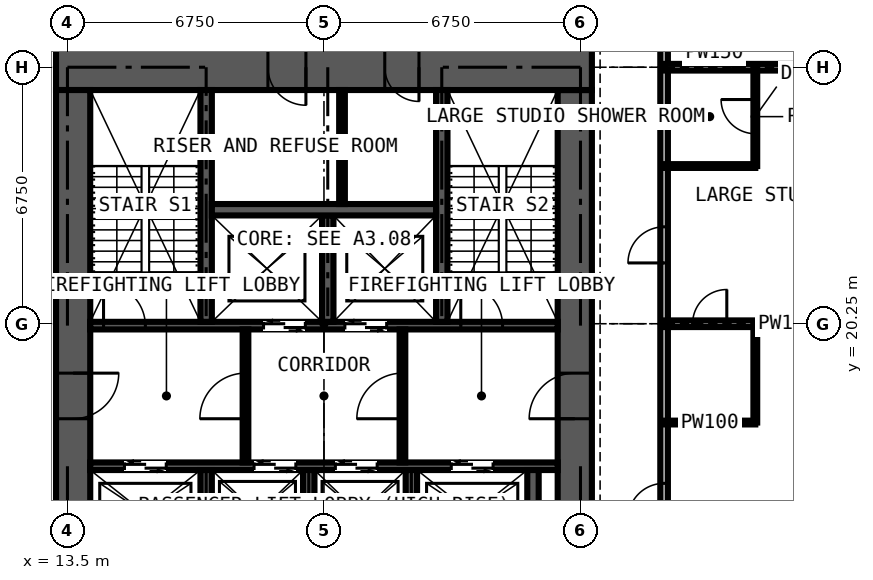
"""IFC4 building model, lengths in metres.
Left out: names, types, materials, properties, quantities, classifications, styles, units other than length and angle.
Written with IfcOpenShell. Run it as: python <this file> out.ifc"""

import sys

from ifc_helpers import new_model, si_unit, direction, frame, frame_2d, origin, place, context, subcontext, project, spatial, rectangle, extrude, element, fill, save


model = new_model("IFC4")
c1 = context("Model", 3, precision=1e-05, world=origin(), true_north=direction((0.0, 1.0)))
c2 = subcontext(c1, "Body", "Model", "MODEL_VIEW")
j1 = project(units=[si_unit("LENGTHUNIT", "METRE"), si_unit("PLANEANGLEUNIT", "RADIAN")], contexts=[c1])
p1 = place(None, origin())
s1 = spatial("IfcSite", under=j1, at=p1, CompositionType="ELEMENT")
p2 = place(p1, origin())
s2 = spatial("IfcBuilding", under=s1, at=p2, CompositionType="ELEMENT")
p3 = place(p2, frame((0.0, 0.0, 236.7)))
s3 = spatial("IfcBuildingStorey", under=s2, at=p3, CompositionType="ELEMENT", Elevation=236.7)
p4 = place(p3, frame((26.85, 14.1, 0.0), z_axis=(0.0, 0.0, 1.0), x_axis=(0.0, 1.0, 0.0)))
e1 = element("IfcWall", 1, at=p4, inside=s3, PredefinedType="SHEAR", context=c2, shape_type="SweptSolid", body=[
    extrude(rectangle(XDim=12.3, YDim=0.9, at=frame_2d((6.15, 0.0))), origin(), (0.0, 0.0, 1.0), 3.6),
])
p5 = place(p4, frame((3.65, 0.0, 0.0)))
e2 = element("IfcOpeningElement", 2, at=p5, cuts=e1, PredefinedType="OPENING", context=c2, shape_type="SweptSolid", body=[
    extrude(rectangle(XDim=1.2, YDim=2.2, at=frame_2d((0.6, 1.1))), frame((0.0, 0.46, 0.0), z_axis=(0.0, -1.0, 0.0), x_axis=(1.0, 0.0, 0.0)), (0.0, 0.0, 1.0), 0.92),
])
p6 = place(p3, frame((27.3, 27.0, 0.0), z_axis=(0.0, 0.0, 1.0), x_axis=(-1.0, 0.0, 0.0)))
e3 = element("IfcWall", 3, at=p6, inside=s3, PredefinedType="SHEAR", context=c2, shape_type="SweptSolid", body=[
    extrude(rectangle(XDim=14.1, YDim=1.2, at=frame_2d((7.05, 0.0))), origin(), (0.0, 0.0, 1.0), 3.6),
])
p7 = place(p6, frame((4.55, 0.0, 0.0)))
e4 = element("IfcOpeningElement", 4, at=p7, cuts=e3, PredefinedType="OPENING", context=c2, shape_type="SweptSolid", body=[
    extrude(rectangle(XDim=0.9, YDim=2.2, at=frame_2d((0.45, 1.1))), frame((0.0, 0.61, 0.0), z_axis=(0.0, -1.0, 0.0), x_axis=(1.0, 0.0, 0.0)), (0.0, 0.0, 1.0), 1.22),
])
p8 = place(p6, frame((7.525, 0.0, 0.0)))
e5 = element("IfcOpeningElement", 5, at=p8, cuts=e3, PredefinedType="OPENING", context=c2, shape_type="SweptSolid", body=[
    extrude(rectangle(XDim=1.0, YDim=2.2, at=frame_2d((0.5, 1.1))), frame((0.0, 0.61, 0.0), z_axis=(0.0, -1.0, 0.0), x_axis=(1.0, 0.0, 0.0)), (0.0, 0.0, 1.0), 1.22),
])
p9 = place(p3, frame((13.65, 26.4, 0.0), z_axis=(0.0, 0.0, 1.0), x_axis=(0.0, -1.0, 0.0)))
e6 = element("IfcWall", 6, at=p9, inside=s3, PredefinedType="SHEAR", context=c2, shape_type="SweptSolid", body=[
    extrude(rectangle(XDim=12.3, YDim=0.9, at=frame_2d((6.15, 0.0))), origin(), (0.0, 0.0, 1.0), 3.6),
])
p10 = place(p9, frame((7.45, 0.0, 0.0)))
e7 = element("IfcOpeningElement", 7, at=p10, cuts=e6, PredefinedType="OPENING", context=c2, shape_type="SweptSolid", body=[
    extrude(rectangle(XDim=1.2, YDim=2.2, at=frame_2d((0.6, 1.1))), frame((0.0, 0.46, 0.0), z_axis=(0.0, -1.0, 0.0), x_axis=(1.0, 0.0, 0.0)), (0.0, 0.0, 1.0), 0.92),
])
p11 = place(p3, frame((14.1, 16.5, 0.0), z_axis=(0.0, 0.0, 1.0), x_axis=(1.0, 0.0, 0.0)))
e8 = element("IfcWall", 8, at=p11, inside=s3, PredefinedType="SHEAR", context=c2, shape_type="SweptSolid", body=[
    extrude(rectangle(XDim=12.3, YDim=0.2, at=frame_2d((6.15, 0.0))), origin(), (0.0, 0.0, 1.0), 3.6),
])
p12 = place(p11, frame((0.9, 0.0, 0.0)))
e9 = element("IfcOpeningElement", 9, at=p12, cuts=e8, PredefinedType="OPENING", context=c2, shape_type="SweptSolid", body=[
    extrude(rectangle(XDim=1.1, YDim=2.2, at=frame_2d((0.55, 1.1))), frame((0.0, 0.11, 0.0), z_axis=(0.0, -1.0, 0.0), x_axis=(1.0, 0.0, 0.0)), (0.0, 0.0, 1.0), 0.22),
])
p13 = place(p11, frame((4.31, 0.0, 0.0)))
e10 = element("IfcOpeningElement", 10, at=p13, cuts=e8, PredefinedType="OPENING", context=c2, shape_type="SweptSolid", body=[
    extrude(rectangle(XDim=1.1, YDim=2.2, at=frame_2d((0.55, 1.1))), frame((0.0, 0.11, 0.0), z_axis=(0.0, -1.0, 0.0), x_axis=(1.0, 0.0, 0.0)), (0.0, 0.0, 1.0), 0.22),
])
p14 = place(p11, frame((6.45, 0.0, 0.0)))
e11 = element("IfcOpeningElement", 11, at=p14, cuts=e8, PredefinedType="OPENING", context=c2, shape_type="SweptSolid", body=[
    extrude(rectangle(XDim=1.1, YDim=2.2, at=frame_2d((0.55, 1.1))), frame((0.0, 0.11, 0.0), z_axis=(0.0, -1.0, 0.0), x_axis=(1.0, 0.0, 0.0)), (0.0, 0.0, 1.0), 0.22),
])
p15 = place(p11, frame((9.5, 0.0, 0.0)))
e12 = element("IfcOpeningElement", 12, at=p15, cuts=e8, PredefinedType="OPENING", context=c2, shape_type="SweptSolid", body=[
    extrude(rectangle(XDim=1.1, YDim=2.2, at=frame_2d((0.55, 1.1))), frame((0.0, 0.11, 0.0), z_axis=(0.0, -1.0, 0.0), x_axis=(1.0, 0.0, 0.0)), (0.0, 0.0, 1.0), 0.22),
])
p16 = place(p3, frame((14.1, 20.2, 0.0), z_axis=(0.0, 0.0, 1.0), x_axis=(1.0, 0.0, 0.0)))
e13 = element("IfcWall", 13, at=p16, inside=s3, PredefinedType="SHEAR", context=c2, shape_type="SweptSolid", body=[
    extrude(rectangle(XDim=12.3, YDim=0.2, at=frame_2d((6.15, 0.0))), origin(), (0.0, 0.0, 1.0), 3.6),
])
p17 = place(p16, frame((4.56, 0.0, 0.0)))
e14 = element("IfcOpeningElement", 14, at=p17, cuts=e13, PredefinedType="OPENING", context=c2, shape_type="SweptSolid", body=[
    extrude(rectangle(XDim=1.1, YDim=2.2, at=frame_2d((0.55, 1.1))), frame((0.0, 0.11, 0.0), z_axis=(0.0, -1.0, 0.0), x_axis=(1.0, 0.0, 0.0)), (0.0, 0.0, 1.0), 0.22),
])
p18 = place(p16, frame((6.7, 0.0, 0.0)))
e15 = element("IfcOpeningElement", 15, at=p18, cuts=e13, PredefinedType="OPENING", context=c2, shape_type="SweptSolid", body=[
    extrude(rectangle(XDim=1.1, YDim=2.2, at=frame_2d((0.55, 1.1))), frame((0.0, 0.11, 0.0), z_axis=(0.0, -1.0, 0.0), x_axis=(1.0, 0.0, 0.0)), (0.0, 0.0, 1.0), 0.22),
])
p19 = place(p16, frame((0.35, 0.0, 0.0)))
e16 = element("IfcOpeningElement", 16, at=p19, cuts=e13, PredefinedType="OPENING", context=c2, shape_type="SweptSolid", body=[
    extrude(rectangle(XDim=1.1, YDim=2.2, at=frame_2d((0.55, 1.1))), frame((0.0, 0.11, 0.0), z_axis=(0.0, -1.0, 0.0), x_axis=(1.0, 0.0, 0.0)), (0.0, 0.0, 1.0), 0.22),
])
p20 = place(p16, frame((9.75, 0.0, 0.0)))
e17 = element("IfcOpeningElement", 17, at=p20, cuts=e13, PredefinedType="OPENING", context=c2, shape_type="SweptSolid", body=[
    extrude(rectangle(XDim=1.1, YDim=2.2, at=frame_2d((0.55, 1.1))), frame((0.0, 0.11, 0.0), z_axis=(0.0, -1.0, 0.0), x_axis=(1.0, 0.0, 0.0)), (0.0, 0.0, 1.0), 0.22),
])
for number, where, z_axis, x_axis in (
    (18, (17.15, 20.3, 0.0), (0.0, 0.0, 1.0), (0.0, 1.0, 0.0)),
    (19, (23.35, 20.3, 0.0), (0.0, 0.0, 1.0), (0.0, 1.0, 0.0)),
):
    element("IfcWall", number, at=place(p3, frame(where, z_axis=z_axis, x_axis=x_axis)), inside=s3, PredefinedType="SHEAR", context=c2, shape_type="SweptSolid", body=[
        extrude(rectangle(XDim=6.1, YDim=0.3, at=frame_2d((3.05, 0.0))), origin(), (0.0, 0.0, 1.0), 3.6),
    ])
p21 = place(p3, frame((20.35, 20.3, 0.0), z_axis=(0.0, 0.0, 1.0), x_axis=(0.0, 1.0, 0.0)))
e20 = element("IfcWall", 20, at=p21, inside=s3, PredefinedType="SHEAR", context=c2, shape_type="SweptSolid", body=[
    extrude(rectangle(XDim=2.8, YDim=0.3, at=frame_2d((1.4, 0.0))), origin(), (0.0, 0.0, 1.0), 3.6),
])
p22 = place(p3, frame((17.3, 23.25, 0.0), z_axis=(0.0, 0.0, 1.0), x_axis=(1.0, 0.0, 0.0)))
e21 = element("IfcWall", 21, at=p22, inside=s3, PredefinedType="SHEAR", context=c2, shape_type="SweptSolid", body=[
    extrude(rectangle(XDim=5.9, YDim=0.3, at=frame_2d((2.95, 0.0))), origin(), (0.0, 0.0, 1.0), 3.6),
])
for number, where, z_axis, x_axis in (
    (22, (17.15, 14.1, 0.0), (0.0, 0.0, 1.0), (0.0, 1.0, 0.0)),
    (23, (19.85, 14.1, 0.0), (0.0, 0.0, 1.0), (0.0, 1.0, 0.0)),
    (24, (22.55, 14.1, 0.0), (0.0, 0.0, 1.0), (0.0, 1.0, 0.0)),
    (25, (25.75, 14.1, 0.0), (0.0, 0.0, 1.0), (0.0, 1.0, 0.0)),
):
    element("IfcWall", number, at=place(p3, frame(where, z_axis=z_axis, x_axis=x_axis)), inside=s3, PredefinedType="SHEAR", context=c2, shape_type="SweptSolid", body=[
        extrude(rectangle(XDim=2.3, YDim=0.3, at=frame_2d((1.15, 0.0))), origin(), (0.0, 0.0, 1.0), 3.6),
    ])
p23 = place(p3, frame((18.185, 16.6, 0.0), z_axis=(0.0, 0.0, 1.0), x_axis=(0.0, 1.0, 0.0)))
e26 = element("IfcWall", 26, at=p23, inside=s3, PredefinedType="PARTITIONING", context=c2, shape_type="SweptSolid", body=[
    extrude(rectangle(XDim=3.5, YDim=0.15, at=frame_2d((1.75, 0.0))), origin(), (0.0, 0.0, 1.0), 3.375),
])
p24 = place(p23, frame((1.15, 0.0, 0.0)))
e27 = element("IfcOpeningElement", 27, at=p24, cuts=e26, PredefinedType="OPENING", context=c2, shape_type="SweptSolid", body=[
    extrude(rectangle(XDim=1.2, YDim=2.2, at=frame_2d((0.6, 1.1))), frame((0.0, 0.085, 0.0), z_axis=(0.0, -1.0, 0.0), x_axis=(1.0, 0.0, 0.0)), (0.0, 0.0, 1.0), 0.17),
])
p25 = place(p3, frame((22.315, 16.6, 0.0), z_axis=(0.0, 0.0, 1.0), x_axis=(0.0, 1.0, 0.0)))
e28 = element("IfcWall", 28, at=p25, inside=s3, PredefinedType="PARTITIONING", context=c2, shape_type="SweptSolid", body=[
    extrude(rectangle(XDim=3.5, YDim=0.15, at=frame_2d((1.75, 0.0))), origin(), (0.0, 0.0, 1.0), 3.375),
])
p26 = place(p25, frame((1.15, 0.0, 0.0)))
e29 = element("IfcOpeningElement", 29, at=p26, cuts=e28, PredefinedType="OPENING", context=c2, shape_type="SweptSolid", body=[
    extrude(rectangle(XDim=1.2, YDim=2.2, at=frame_2d((0.6, 1.1))), frame((0.0, 0.085, 0.0), z_axis=(0.0, -1.0, 0.0), x_axis=(1.0, 0.0, 0.0)), (0.0, 0.0, 1.0), 0.17),
])
p27 = place(p3, frame((20.725, 23.4, 0.0), z_axis=(0.0, 0.0, 1.0), x_axis=(0.0, 1.0, 0.0)))
e30 = element("IfcWall", 30, at=p27, inside=s3, PredefinedType="PARTITIONING", context=c2, shape_type="SweptSolid", body=[
    extrude(rectangle(XDim=3.0, YDim=0.15, at=frame_2d((1.5, 0.0))), origin(), (0.0, 0.0, 1.0), 3.375),
])
p28 = place(p3, frame((29.2, 11.3, 0.0), z_axis=(0.0, 0.0, 1.0), x_axis=(0.0, 1.0, 0.0)))
e31 = element("IfcWall", 31, at=p28, inside=s3, PredefinedType="PARTITIONING", context=c2, shape_type="SweptSolid", body=[
    extrude(rectangle(XDim=17.9, YDim=0.2, at=frame_2d((8.95, 0.0))), origin(), (0.0, 0.0, 1.0), 3.375),
])
p29 = place(p28, frame((0.6, 0.0, 0.0)))
e32 = element("IfcOpeningElement", 32, at=p29, cuts=e31, PredefinedType="OPENING", context=c2, shape_type="SweptSolid", body=[
    extrude(rectangle(XDim=1.0, YDim=2.2, at=frame_2d((0.5, 1.1))), frame((0.0, 0.11, 0.0), z_axis=(0.0, -1.0, 0.0), x_axis=(1.0, 0.0, 0.0)), (0.0, 0.0, 1.0), 0.22),
])
p30 = place(p28, frame((10.55, 0.0, 0.0)))
e33 = element("IfcOpeningElement", 33, at=p30, cuts=e31, PredefinedType="OPENING", context=c2, shape_type="SweptSolid", body=[
    extrude(rectangle(XDim=0.95, YDim=2.2, at=frame_2d((0.475, 1.1))), frame((0.0, 0.11, 0.0), z_axis=(0.0, -1.0, 0.0), x_axis=(1.0, 0.0, 0.0)), (0.0, 0.0, 1.0), 0.22),
])
p31 = place(p28, frame((3.8, 0.0, 0.0)))
e34 = element("IfcOpeningElement", 34, at=p31, cuts=e31, PredefinedType="OPENING", context=c2, shape_type="SweptSolid", body=[
    extrude(rectangle(XDim=0.95, YDim=2.2, at=frame_2d((0.475, 1.1))), frame((0.0, 0.11, 0.0), z_axis=(0.0, -1.0, 0.0), x_axis=(1.0, 0.0, 0.0)), (0.0, 0.0, 1.0), 0.22),
])
p32 = place(p28, frame((16.3, 0.0, 0.0)))
e35 = element("IfcOpeningElement", 35, at=p32, cuts=e31, PredefinedType="OPENING", context=c2, shape_type="SweptSolid", body=[
    extrude(rectangle(XDim=1.0, YDim=2.2, at=frame_2d((0.5, 1.1))), frame((0.0, 0.11, 0.0), z_axis=(0.0, -1.0, 0.0), x_axis=(1.0, 0.0, 0.0)), (0.0, 0.0, 1.0), 0.22),
])
p33 = place(p3, frame((29.2, 17.65, 0.0), z_axis=(0.0, 0.0, 1.0), x_axis=(1.0, 0.0, 0.0)))
e36 = element("IfcWall", 36, at=p33, inside=s3, PredefinedType="PARTITIONING", context=c2, shape_type="SweptSolid", body=[
    extrude(rectangle(XDim=2.4, YDim=0.1, at=frame_2d((1.2, 0.0))), origin(), (0.0, 0.0, 1.0), 3.375),
])
p34 = place(p3, frame((29.2, 20.25, 0.0), z_axis=(0.0, 0.0, 1.0), x_axis=(1.0, 0.0, 0.0)))
e37 = element("IfcWall", 37, at=p34, inside=s3, PredefinedType="PARTITIONING", context=c2, shape_type="SweptSolid", body=[
    extrude(rectangle(XDim=5.284, YDim=0.175, at=frame_2d((2.642, 0.0))), origin(), (0.0, 0.0, 1.0), 2.877),
])
p35 = place(p34, frame((0.75, 0.0, 0.0)))
e38 = element("IfcOpeningElement", 38, at=p35, cuts=e37, PredefinedType="OPENING", context=c2, shape_type="SweptSolid", body=[
    extrude(rectangle(XDim=0.9, YDim=2.2, at=frame_2d((0.45, 1.1))), frame((0.0, 0.097, 0.0), z_axis=(0.0, -1.0, 0.0), x_axis=(1.0, 0.0, 0.0)), (0.0, 0.0, 1.0), 0.195),
])
p36 = place(p3, frame((29.2, 24.4, 0.0), z_axis=(0.0, 0.0, 1.0), x_axis=(1.0, 0.0, 0.0)))
e39 = element("IfcWall", 39, at=p36, inside=s3, PredefinedType="PARTITIONING", context=c2, shape_type="SweptSolid", body=[
    extrude(rectangle(XDim=2.4, YDim=0.1, at=frame_2d((1.2, 0.0))), origin(), (0.0, 0.0, 1.0), 3.375),
])
p37 = place(p3, frame((29.2, 27.0, 0.0), z_axis=(0.0, 0.0, 1.0), x_axis=(1.0, 0.0, 0.0)))
e40 = element("IfcWall", 40, at=p37, inside=s3, PredefinedType="PARTITIONING", context=c2, shape_type="SweptSolid", body=[
    extrude(rectangle(XDim=5.284, YDim=0.175, at=frame_2d((2.642, 0.0))), origin(), (0.0, 0.0, 1.0), 2.877),
])
p38 = place(p3, frame((31.125, 27.0, 0.0), z_axis=(0.0, 0.0, 1.0), x_axis=(0.0, 1.0, 0.0)))
e41 = element("IfcWall", 41, at=p38, inside=s3, PredefinedType="PARTITIONING", context=c2, shape_type="SweptSolid", body=[
    extrude(rectangle(XDim=0.734, YDim=0.15, at=frame_2d((0.367, 0.0))), origin(), (0.0, 0.0, 1.0), 3.375),
])
p39 = place(p3, frame((31.6, 17.65, 0.0), z_axis=(0.0, 0.0, 1.0), x_axis=(0.0, 1.0, 0.0)))
e42 = element("IfcWall", 42, at=p39, inside=s3, PredefinedType="PARTITIONING", context=c2, shape_type="SweptSolid", body=[
    extrude(rectangle(XDim=2.6, YDim=0.1, at=frame_2d((1.3, 0.0))), origin(), (0.0, 0.0, 1.0), 3.375),
])
p40 = place(p3, frame((31.6, 24.4, 0.0), z_axis=(0.0, 0.0, 1.0), x_axis=(0.0, 1.0, 0.0)))
e43 = element("IfcWall", 43, at=p40, inside=s3, PredefinedType="PARTITIONING", context=c2, shape_type="SweptSolid", body=[
    extrude(rectangle(XDim=2.6, YDim=0.1, at=frame_2d((1.3, 0.0))), origin(), (0.0, 0.0, 1.0), 3.375),
])
p41 = place(p40, frame((0.85, 0.0, 0.0)))
e44 = element("IfcOpeningElement", 44, at=p41, cuts=e43, PredefinedType="OPENING", context=c2, shape_type="SweptSolid", body=[
    extrude(rectangle(XDim=0.9, YDim=2.2, at=frame_2d((0.45, 1.1))), frame((0.0, 0.06, 0.0), z_axis=(0.0, -1.0, 0.0), x_axis=(1.0, 0.0, 0.0)), (0.0, 0.0, 1.0), 0.12),
])
p42 = place(p12, origin())
e45 = element("IfcDoor", 45, at=p42, inside=s3, OperationType="DOUBLE_DOOR_SLIDING", PredefinedType="DOOR", context=c2, shape_type="SweptSolid", body=[
    extrude(rectangle(XDim=1.1, YDim=2.2, at=frame_2d((0.55, 1.1))), frame((0.0, 0.025, 0.0), z_axis=(0.0, -1.0, 0.0), x_axis=(1.0, 0.0, 0.0)), (0.0, 0.0, 1.0), 0.05),
])
fill(e9, e45)
p43 = place(p13, origin())
e46 = element("IfcDoor", 46, at=p43, inside=s3, OperationType="DOUBLE_DOOR_SLIDING", PredefinedType="DOOR", context=c2, shape_type="SweptSolid", body=[
    extrude(rectangle(XDim=1.1, YDim=2.2, at=frame_2d((0.55, 1.1))), frame((0.0, 0.025, 0.0), z_axis=(0.0, -1.0, 0.0), x_axis=(1.0, 0.0, 0.0)), (0.0, 0.0, 1.0), 0.05),
])
fill(e10, e46)
p44 = place(p14, origin())
e47 = element("IfcDoor", 47, at=p44, inside=s3, OperationType="DOUBLE_DOOR_SLIDING", PredefinedType="DOOR", context=c2, shape_type="SweptSolid", body=[
    extrude(rectangle(XDim=1.1, YDim=2.2, at=frame_2d((0.55, 1.1))), frame((0.0, 0.025, 0.0), z_axis=(0.0, -1.0, 0.0), x_axis=(1.0, 0.0, 0.0)), (0.0, 0.0, 1.0), 0.05),
])
fill(e11, e47)
p45 = place(p15, origin())
e48 = element("IfcDoor", 48, at=p45, inside=s3, OperationType="DOUBLE_DOOR_SLIDING", PredefinedType="DOOR", context=c2, shape_type="SweptSolid", body=[
    extrude(rectangle(XDim=1.1, YDim=2.2, at=frame_2d((0.55, 1.1))), frame((0.0, 0.025, 0.0), z_axis=(0.0, -1.0, 0.0), x_axis=(1.0, 0.0, 0.0)), (0.0, 0.0, 1.0), 0.05),
])
fill(e12, e48)
p46 = place(p17, origin())
e49 = element("IfcDoor", 49, at=p46, inside=s3, OperationType="DOUBLE_DOOR_SLIDING", PredefinedType="DOOR", context=c2, shape_type="SweptSolid", body=[
    extrude(rectangle(XDim=1.1, YDim=2.2, at=frame_2d((0.55, 1.1))), frame((0.0, 0.025, 0.0), z_axis=(0.0, -1.0, 0.0), x_axis=(1.0, 0.0, 0.0)), (0.0, 0.0, 1.0), 0.05),
])
fill(e14, e49)
p47 = place(p18, origin())
e50 = element("IfcDoor", 50, at=p47, inside=s3, OperationType="DOUBLE_DOOR_SLIDING", PredefinedType="DOOR", context=c2, shape_type="SweptSolid", body=[
    extrude(rectangle(XDim=1.1, YDim=2.2, at=frame_2d((0.55, 1.1))), frame((0.0, 0.025, 0.0), z_axis=(0.0, -1.0, 0.0), x_axis=(1.0, 0.0, 0.0)), (0.0, 0.0, 1.0), 0.05),
])
fill(e15, e50)
p48 = place(p10, origin())
e51 = element("IfcDoor", 51, at=p48, inside=s3, OperationType="DOUBLE_DOOR_SINGLE_SWING", PredefinedType="DOOR", context=c2, shape_type="SweptSolid", body=[
    extrude(rectangle(XDim=1.2, YDim=2.2, at=frame_2d((0.6, 1.1))), frame((0.0, 0.025, 0.0), z_axis=(0.0, -1.0, 0.0), x_axis=(1.0, 0.0, 0.0)), (0.0, 0.0, 1.0), 0.05),
])
fill(e7, e51)
p49 = place(p5, origin())
e52 = element("IfcDoor", 52, at=p49, inside=s3, OperationType="DOUBLE_DOOR_SINGLE_SWING", PredefinedType="DOOR", context=c2, shape_type="SweptSolid", body=[
    extrude(rectangle(XDim=1.2, YDim=2.2, at=frame_2d((0.6, 1.1))), frame((0.0, 0.025, 0.0), z_axis=(0.0, -1.0, 0.0), x_axis=(1.0, 0.0, 0.0)), (0.0, 0.0, 1.0), 0.05),
])
fill(e2, e52)
p50 = place(p24, origin())
e53 = element("IfcDoor", 53, at=p50, inside=s3, OperationType="DOUBLE_DOOR_SINGLE_SWING", PredefinedType="DOOR", context=c2, shape_type="SweptSolid", body=[
    extrude(rectangle(XDim=1.2, YDim=2.2, at=frame_2d((0.6, 1.1))), frame((0.0, 0.025, 0.0), z_axis=(0.0, -1.0, 0.0), x_axis=(1.0, 0.0, 0.0)), (0.0, 0.0, 1.0), 0.05),
])
fill(e27, e53)
p51 = place(p26, origin())
e54 = element("IfcDoor", 54, at=p51, inside=s3, OperationType="DOUBLE_DOOR_SINGLE_SWING", PredefinedType="DOOR", context=c2, shape_type="SweptSolid", body=[
    extrude(rectangle(XDim=1.2, YDim=2.2, at=frame_2d((0.6, 1.1))), frame((0.0, 0.025, 0.0), z_axis=(0.0, -1.0, 0.0), x_axis=(1.0, 0.0, 0.0)), (0.0, 0.0, 1.0), 0.05),
])
fill(e29, e54)
p52 = place(p7, origin())
e55 = element("IfcDoor", 55, at=p52, inside=s3, OperationType="SINGLE_SWING_LEFT", PredefinedType="DOOR", context=c2, shape_type="SweptSolid", body=[
    extrude(rectangle(XDim=0.9, YDim=2.2, at=frame_2d((0.45, 1.1))), frame((0.0, 0.4, 0.0), z_axis=(0.0, -1.0, 0.0), x_axis=(1.0, 0.0, 0.0)), (0.0, 0.0, 1.0), 0.8),
])
fill(e4, e55)
p53 = place(p8, origin())
e56 = element("IfcDoor", 56, at=p53, inside=s3, OperationType="SINGLE_SWING_LEFT", PredefinedType="DOOR", context=c2, shape_type="SweptSolid", body=[
    extrude(rectangle(XDim=1.0, YDim=2.2, at=frame_2d((0.5, 1.1))), frame((0.0, 0.025, 0.0), z_axis=(0.0, -1.0, 0.0), x_axis=(1.0, 0.0, 0.0)), (0.0, 0.0, 1.0), 0.05),
])
fill(e5, e56)
p54 = place(p19, origin())
e57 = element("IfcDoor", 57, at=p54, inside=s3, OperationType="SINGLE_SWING_LEFT", PredefinedType="DOOR", context=c2, shape_type="SweptSolid", body=[
    extrude(rectangle(XDim=1.1, YDim=2.2, at=frame_2d((0.55, 1.1))), frame((0.0, 0.025, 0.0), z_axis=(0.0, -1.0, 0.0), x_axis=(1.0, 0.0, 0.0)), (0.0, 0.0, 1.0), 0.05),
])
fill(e16, e57)
p55 = place(p20, origin())
e58 = element("IfcDoor", 58, at=p55, inside=s3, OperationType="SINGLE_SWING_LEFT", PredefinedType="DOOR", context=c2, shape_type="SweptSolid", body=[
    extrude(rectangle(XDim=1.1, YDim=2.2, at=frame_2d((0.55, 1.1))), frame((0.0, 0.025, 0.0), z_axis=(0.0, -1.0, 0.0), x_axis=(1.0, 0.0, 0.0)), (0.0, 0.0, 1.0), 0.05),
])
fill(e17, e58)
p56 = place(p30, origin())
e59 = element("IfcDoor", 59, at=p56, inside=s3, OperationType="SINGLE_SWING_LEFT", PredefinedType="DOOR", context=c2, shape_type="SweptSolid", body=[
    extrude(rectangle(XDim=0.95, YDim=2.2, at=frame_2d((0.475, 1.1))), frame((0.0, 0.025, 0.0), z_axis=(0.0, -1.0, 0.0), x_axis=(1.0, 0.0, 0.0)), (0.0, 0.0, 1.0), 0.05),
])
fill(e33, e59)
p57 = place(p41, origin())
e60 = element("IfcDoor", 60, at=p57, inside=s3, OperationType="SINGLE_SWING_RIGHT", PredefinedType="DOOR", context=c2, shape_type="SweptSolid", body=[
    extrude(rectangle(XDim=0.9, YDim=2.2, at=frame_2d((0.45, 1.1))), frame((0.0, 0.025, 0.0), z_axis=(0.0, -1.0, 0.0), x_axis=(1.0, 0.0, 0.0)), (0.0, 0.0, 1.0), 0.05),
])
fill(e44, e60)
p58 = place(p31, origin())
e61 = element("IfcDoor", 61, at=p58, inside=s3, OperationType="SINGLE_SWING_LEFT", PredefinedType="DOOR", context=c2, shape_type="SweptSolid", body=[
    extrude(rectangle(XDim=0.95, YDim=2.2, at=frame_2d((0.475, 1.1))), frame((0.0, 0.025, 0.0), z_axis=(0.0, -1.0, 0.0), x_axis=(1.0, 0.0, 0.0)), (0.0, 0.0, 1.0), 0.05),
])
fill(e34, e61)
p59 = place(p35, origin())
e62 = element("IfcDoor", 62, at=p59, inside=s3, OperationType="SINGLE_SWING_RIGHT", PredefinedType="DOOR", context=c2, shape_type="SweptSolid", body=[
    extrude(rectangle(XDim=0.9, YDim=2.2, at=frame_2d((0.45, 1.1))), frame((0.0, 0.025, 0.0), z_axis=(0.0, -1.0, 0.0), x_axis=(1.0, 0.0, 0.0)), (0.0, 0.0, 1.0), 0.05),
])
fill(e38, e62)
save(model, sys.argv[1])
